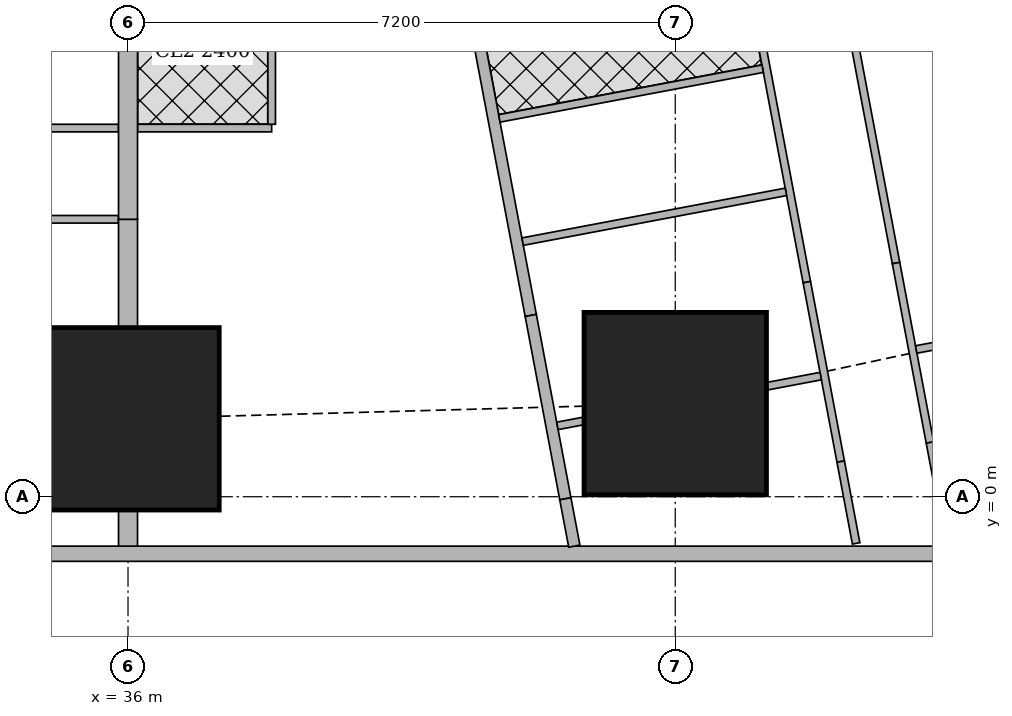
"""IFC4 building model, lengths in metres.
Left out: names, types, materials, properties, quantities, classifications, styles, units other than length and angle.
Written with IfcOpenShell. Run it as: python <this file> out.ifc"""

import sys

from ifc_helpers import new_model, si_unit, direction, frame, frame_2d, origin, origin_2d, place, context, subcontext, project, spatial, rectangle, extrude, element, fill, save


model = new_model("IFC4")
c1 = context("Model", 3, precision=1e-05, world=origin(), true_north=direction((0.0, 1.0)))
c2 = subcontext(c1, "Body", "Model", "MODEL_VIEW")
j1 = project(units=[si_unit("LENGTHUNIT", "METRE"), si_unit("PLANEANGLEUNIT", "RADIAN")], contexts=[c1])
p1 = place(None, origin())
s1 = spatial("IfcSite", under=j1, at=p1, CompositionType="ELEMENT")
p2 = place(p1, origin())
s2 = spatial("IfcBuilding", under=s1, at=p2, CompositionType="ELEMENT")
p3 = place(p2, frame((0.0, 0.0, 223.7)))
s3 = spatial("IfcBuildingStorey", under=s2, at=p3, CompositionType="ELEMENT", Elevation=223.7)
for number, where, z_axis, x_axis in (
    (1, (36.0, 1.025, 0.0), (0.0, 0.0, 1.0), (1.0, 0.0, 0.0)),
    (2, (43.2, 1.225, 0.0), (0.0, 0.0, 1.0), (1.0, 0.0, 0.0)),
):
    element("IfcColumn", number, at=place(p3, frame(where, z_axis=z_axis, x_axis=x_axis)), inside=s3, PredefinedType="COLUMN", context=c2, shape_type="SweptSolid", body=[
        extrude(rectangle(XDim=2.4, YDim=2.4, at=origin_2d()), origin(), (0.0, 0.0, 1.0), 3.75),
    ])
p4 = place(p3, frame((14.563, -0.75, 0.0), z_axis=(0.0, 0.0, 1.0), x_axis=(1.0, 0.0, 0.0)))
e3 = element("IfcWall", 3, at=p4, inside=s3, PredefinedType="SOLIDWALL", context=c2, shape_type="SweptSolid", body=[
    extrude(rectangle(XDim=33.228, YDim=0.2, at=frame_2d((16.614, 0.0))), origin(), (0.0, 0.0, 1.0), 3.5),
])
p5 = place(p4, frame((2.319, 0.0, 0.9)))
e4 = element("IfcOpeningElement", 4, at=p5, cuts=e3, PredefinedType="OPENING", context=c2, shape_type="SweptSolid", body=[
    extrude(rectangle(XDim=2.4, YDim=1.5, at=frame_2d((1.2, 0.75))), frame((0.0, 0.11, 0.0), z_axis=(0.0, -1.0, 0.0), x_axis=(1.0, 0.0, 0.0)), (0.0, 0.0, 1.0), 0.22),
])
p6 = place(p4, frame((7.937, 0.0, 0.9)))
e5 = element("IfcOpeningElement", 5, at=p6, cuts=e3, PredefinedType="OPENING", context=c2, shape_type="SweptSolid", body=[
    extrude(rectangle(XDim=1.8, YDim=1.5, at=frame_2d((0.9, 0.75))), frame((0.0, 0.11, 0.0), z_axis=(0.0, -1.0, 0.0), x_axis=(1.0, 0.0, 0.0)), (0.0, 0.0, 1.0), 0.22),
])
p7 = place(p4, frame((11.537, 0.0, 0.9)))
e6 = element("IfcOpeningElement", 6, at=p7, cuts=e3, PredefinedType="OPENING", context=c2, shape_type="SweptSolid", body=[
    extrude(rectangle(XDim=1.8, YDim=1.5, at=frame_2d((0.9, 0.75))), frame((0.0, 0.11, 0.0), z_axis=(0.0, -1.0, 0.0), x_axis=(1.0, 0.0, 0.0)), (0.0, 0.0, 1.0), 0.22),
])
p8 = place(p4, frame((15.137, 0.0, 0.9)))
e7 = element("IfcOpeningElement", 7, at=p8, cuts=e3, PredefinedType="OPENING", context=c2, shape_type="SweptSolid", body=[
    extrude(rectangle(XDim=1.8, YDim=1.5, at=frame_2d((0.9, 0.75))), frame((0.0, 0.11, 0.0), z_axis=(0.0, -1.0, 0.0), x_axis=(1.0, 0.0, 0.0)), (0.0, 0.0, 1.0), 0.22),
])
p9 = place(p4, frame((18.737, 0.0, 0.9)))
e8 = element("IfcOpeningElement", 8, at=p9, cuts=e3, PredefinedType="OPENING", context=c2, shape_type="SweptSolid", body=[
    extrude(rectangle(XDim=1.8, YDim=1.5, at=frame_2d((0.9, 0.75))), frame((0.0, 0.11, 0.0), z_axis=(0.0, -1.0, 0.0), x_axis=(1.0, 0.0, 0.0)), (0.0, 0.0, 1.0), 0.22),
])
p10 = place(p4, frame((22.337, 0.0, 0.9)))
e9 = element("IfcOpeningElement", 9, at=p10, cuts=e3, PredefinedType="OPENING", context=c2, shape_type="SweptSolid", body=[
    extrude(rectangle(XDim=1.8, YDim=1.5, at=frame_2d((0.9, 0.75))), frame((0.0, 0.11, 0.0), z_axis=(0.0, -1.0, 0.0), x_axis=(1.0, 0.0, 0.0)), (0.0, 0.0, 1.0), 0.22),
])
p11 = place(p3, frame((50.653, 2.703, 0.0), z_axis=(0.0, 0.0, 1.0), x_axis=(-0.185612026696, 0.982623109613, 0.0)))
e10 = element("IfcWall", 10, at=p11, inside=s3, PredefinedType="SOLIDWALL", context=c2, shape_type="SweptSolid", body=[
    extrude(rectangle(XDim=41.393, YDim=0.2, at=frame_2d((20.697, 0.0))), origin(), (0.0, 0.0, 1.0), 3.5),
])
p12 = place(p11, frame((1.633, 0.0, 0.9)))
e11 = element("IfcOpeningElement", 11, at=p12, cuts=e10, PredefinedType="OPENING", context=c2, shape_type="SweptSolid", body=[
    extrude(rectangle(XDim=1.8, YDim=1.5, at=frame_2d((0.9, 0.75))), frame((0.0, 0.11, 0.0), z_axis=(0.0, -1.0, 0.0), x_axis=(1.0, 0.0, 0.0)), (0.0, 0.0, 1.0), 0.22),
])
p13 = place(p11, frame((6.032, 0.0, 0.9)))
e12 = element("IfcOpeningElement", 12, at=p13, cuts=e10, PredefinedType="OPENING", context=c2, shape_type="SweptSolid", body=[
    extrude(rectangle(XDim=1.8, YDim=1.5, at=frame_2d((0.9, 0.75))), frame((0.0, 0.11, 0.0), z_axis=(0.0, -1.0, 0.0), x_axis=(1.0, 0.0, 0.0)), (0.0, 0.0, 1.0), 0.22),
])
p14 = place(p11, frame((9.848, 0.0, 0.9)))
e13 = element("IfcOpeningElement", 13, at=p14, cuts=e10, PredefinedType="OPENING", context=c2, shape_type="SweptSolid", body=[
    extrude(rectangle(XDim=1.8, YDim=1.5, at=frame_2d((0.9, 0.75))), frame((0.0, 0.11, 0.0), z_axis=(0.0, -1.0, 0.0), x_axis=(1.0, 0.0, 0.0)), (0.0, 0.0, 1.0), 0.22),
])
p15 = place(p11, frame((13.664, 0.0, 0.9)))
e14 = element("IfcOpeningElement", 14, at=p15, cuts=e10, PredefinedType="OPENING", context=c2, shape_type="SweptSolid", body=[
    extrude(rectangle(XDim=1.8, YDim=1.5, at=frame_2d((0.9, 0.75))), frame((0.0, 0.11, 0.0), z_axis=(0.0, -1.0, 0.0), x_axis=(1.0, 0.0, 0.0)), (0.0, 0.0, 1.0), 0.22),
])
p16 = place(p11, frame((17.481, 0.0, 0.9)))
e15 = element("IfcOpeningElement", 15, at=p16, cuts=e10, PredefinedType="OPENING", context=c2, shape_type="SweptSolid", body=[
    extrude(rectangle(XDim=1.8, YDim=1.5, at=frame_2d((0.9, 0.75))), frame((0.0, 0.11, 0.0), z_axis=(0.0, -1.0, 0.0), x_axis=(1.0, 0.0, 0.0)), (0.0, 0.0, 1.0), 0.22),
])
p17 = place(p11, frame((21.297, 0.0, 0.9)))
e16 = element("IfcOpeningElement", 16, at=p17, cuts=e10, PredefinedType="OPENING", context=c2, shape_type="SweptSolid", body=[
    extrude(rectangle(XDim=1.8, YDim=1.5, at=frame_2d((0.9, 0.75))), frame((0.0, 0.11, 0.0), z_axis=(0.0, -1.0, 0.0), x_axis=(1.0, 0.0, 0.0)), (0.0, 0.0, 1.0), 0.22),
])
p18 = place(p11, frame((25.113, 0.0, 0.9)))
e17 = element("IfcOpeningElement", 17, at=p18, cuts=e10, PredefinedType="OPENING", context=c2, shape_type="SweptSolid", body=[
    extrude(rectangle(XDim=1.8, YDim=1.5, at=frame_2d((0.9, 0.75))), frame((0.0, 0.11, 0.0), z_axis=(0.0, -1.0, 0.0), x_axis=(1.0, 0.0, 0.0)), (0.0, 0.0, 1.0), 0.22),
])
p19 = place(p11, frame((28.93, 0.0, 0.9)))
e18 = element("IfcOpeningElement", 18, at=p19, cuts=e10, PredefinedType="OPENING", context=c2, shape_type="SweptSolid", body=[
    extrude(rectangle(XDim=1.8, YDim=1.5, at=frame_2d((0.9, 0.75))), frame((0.0, 0.11, 0.0), z_axis=(0.0, -1.0, 0.0), x_axis=(1.0, 0.0, 0.0)), (0.0, 0.0, 1.0), 0.22),
])
p20 = place(p11, frame((32.746, 0.0, 0.9)))
e19 = element("IfcOpeningElement", 19, at=p20, cuts=e10, PredefinedType="OPENING", context=c2, shape_type="SweptSolid", body=[
    extrude(rectangle(XDim=1.8, YDim=1.5, at=frame_2d((0.9, 0.75))), frame((0.0, 0.11, 0.0), z_axis=(0.0, -1.0, 0.0), x_axis=(1.0, 0.0, 0.0)), (0.0, 0.0, 1.0), 0.22),
])
p21 = place(p11, frame((36.481, 0.0, 0.9)))
e20 = element("IfcOpeningElement", 20, at=p21, cuts=e10, PredefinedType="OPENING", context=c2, shape_type="SweptSolid", body=[
    extrude(rectangle(XDim=1.8, YDim=1.5, at=frame_2d((0.9, 0.75))), frame((0.0, 0.11, 0.0), z_axis=(0.0, -1.0, 0.0), x_axis=(1.0, 0.0, 0.0)), (0.0, 0.0, 1.0), 0.22),
])
p22 = place(p3, frame((33.68, 42.723, 0.0), z_axis=(0.0, 0.0, 1.0), x_axis=(0.185601160014, -0.982625162207, 0.0)))
e21 = element("IfcWall", 21, at=p22, inside=s3, PredefinedType="SOLIDWALL", context=c2, shape_type="SweptSolid", body=[
    extrude(rectangle(XDim=41.051, YDim=0.15, at=frame_2d((20.526, 0.0))), origin(), (0.0, 0.0, 1.0), 2.5),
])
p23 = place(p22, frame((16.123, 0.0, 0.0)))
e22 = element("IfcOpeningElement", 22, at=p23, cuts=e21, PredefinedType="OPENING", context=c2, shape_type="SweptSolid", body=[
    extrude(rectangle(XDim=1.0, YDim=2.1, at=frame_2d((0.5, 1.05))), frame((0.0, 0.085, 0.0), z_axis=(0.0, -1.0, 0.0), x_axis=(1.0, 0.0, 0.0)), (0.0, 0.0, 1.0), 0.17),
])
p24 = place(p22, frame((19.938, 0.0, 0.0)))
e23 = element("IfcOpeningElement", 23, at=p24, cuts=e21, PredefinedType="OPENING", context=c2, shape_type="SweptSolid", body=[
    extrude(rectangle(XDim=1.0, YDim=2.1, at=frame_2d((0.5, 1.05))), frame((0.0, 0.085, 0.0), z_axis=(0.0, -1.0, 0.0), x_axis=(1.0, 0.0, 0.0)), (0.0, 0.0, 1.0), 0.17),
])
p25 = place(p22, frame((30.902, 0.0, 0.0)))
e24 = element("IfcOpeningElement", 24, at=p25, cuts=e21, PredefinedType="OPENING", context=c2, shape_type="SweptSolid", body=[
    extrude(rectangle(XDim=1.0, YDim=2.1, at=frame_2d((0.5, 1.05))), frame((0.0, 0.085, 0.0), z_axis=(0.0, -1.0, 0.0), x_axis=(1.0, 0.0, 0.0)), (0.0, 0.0, 1.0), 0.17),
])
p26 = place(p3, frame((41.299, 2.385, 0.0), z_axis=(0.0, 0.0, 1.0), x_axis=(0.18529731833, -0.982682504077, 0.0)))
e25 = element("IfcWall", 25, at=p26, inside=s3, PredefinedType="SOLIDWALL", context=c2, shape_type="SweptSolid", body=[
    extrude(rectangle(XDim=2.455, YDim=0.15, at=frame_2d((1.227, 0.0))), origin(), (0.0, 0.0, 1.0), 2.05),
])
p27 = place(p3, frame((41.754, -0.027, 0.0), z_axis=(0.0, 0.0, 1.0), x_axis=(0.186404157015, -0.982473149886, 0.0)))
e26 = element("IfcWall", 26, at=p27, inside=s3, PredefinedType="SOLIDWALL", context=c2, shape_type="SweptSolid", body=[
    extrude(rectangle(XDim=0.634, YDim=0.15, at=frame_2d((0.317, 0.0))), origin(), (0.0, 0.0, 1.0), 3.5),
])
p28 = place(p3, frame((35.875, 3.65, 0.0), z_axis=(0.0, 0.0, 1.0), x_axis=(-1.0, 0.0, 0.0)))
e27 = element("IfcWall", 27, at=p28, inside=s3, PredefinedType="PARTITIONING", context=c2, shape_type="SweptSolid", body=[
    extrude(rectangle(XDim=7.075, YDim=0.1, at=frame_2d((3.538, 0.0))), origin(), (0.0, 0.0, 1.0), 3.5),
])
p29 = place(p28, frame((4.95, 0.0, 0.0)))
e28 = element("IfcOpeningElement", 28, at=p29, cuts=e27, PredefinedType="OPENING", context=c2, shape_type="SweptSolid", body=[
    extrude(rectangle(XDim=0.9, YDim=2.1, at=frame_2d((0.45, 1.05))), frame((0.0, 0.06, 0.0), z_axis=(0.0, -1.0, 0.0), x_axis=(1.0, 0.0, 0.0)), (0.0, 0.0, 1.0), 0.12),
])
p30 = place(p28, frame((2.375, 0.0, 0.0)))
e29 = element("IfcOpeningElement", 29, at=p30, cuts=e27, PredefinedType="OPENING", context=c2, shape_type="SweptSolid", body=[
    extrude(rectangle(XDim=0.9, YDim=2.1, at=frame_2d((0.45, 1.05))), frame((0.0, 0.06, 0.0), z_axis=(0.0, -1.0, 0.0), x_axis=(1.0, 0.0, 0.0)), (0.0, 0.0, 1.0), 0.12),
])
p31 = place(p3, frame((35.875, 4.85, 0.0), z_axis=(0.0, 0.0, 1.0), x_axis=(-1.0, 0.0, 0.0)))
e30 = element("IfcWall", 30, at=p31, inside=s3, PredefinedType="PARTITIONING", context=c2, shape_type="SweptSolid", body=[
    extrude(rectangle(XDim=7.075, YDim=0.1, at=frame_2d((3.538, 0.0))), origin(), (0.0, 0.0, 1.0), 3.5),
])
p32 = place(p31, frame((5.6, 0.0, 0.0)))
e31 = element("IfcOpeningElement", 31, at=p32, cuts=e30, PredefinedType="OPENING", context=c2, shape_type="SweptSolid", body=[
    extrude(rectangle(XDim=0.9, YDim=2.1, at=frame_2d((0.45, 1.05))), frame((0.0, 0.06, 0.0), z_axis=(0.0, -1.0, 0.0), x_axis=(1.0, 0.0, 0.0)), (0.0, 0.0, 1.0), 0.12),
])
p33 = place(p31, frame((2.225, 0.0, 0.0)))
e32 = element("IfcOpeningElement", 32, at=p33, cuts=e30, PredefinedType="OPENING", context=c2, shape_type="SweptSolid", body=[
    extrude(rectangle(XDim=0.9, YDim=2.1, at=frame_2d((0.45, 1.05))), frame((0.0, 0.06, 0.0), z_axis=(0.0, -1.0, 0.0), x_axis=(1.0, 0.0, 0.0)), (0.0, 0.0, 1.0), 0.12),
])
p34 = place(p31, frame((3.8, 0.0, 0.0)))
e33 = element("IfcOpeningElement", 33, at=p34, cuts=e30, PredefinedType="OPENING", context=c2, shape_type="SweptSolid", body=[
    extrude(rectangle(XDim=0.9, YDim=2.1, at=frame_2d((0.45, 1.05))), frame((0.0, 0.06, 0.0), z_axis=(0.0, -1.0, 0.0), x_axis=(1.0, 0.0, 0.0)), (0.0, 0.0, 1.0), 0.12),
])
p35 = place(p31, frame((0.425, 0.0, 0.0)))
e34 = element("IfcOpeningElement", 34, at=p35, cuts=e30, PredefinedType="OPENING", context=c2, shape_type="SweptSolid", body=[
    extrude(rectangle(XDim=0.9, YDim=2.1, at=frame_2d((0.45, 1.05))), frame((0.0, 0.06, 0.0), z_axis=(0.0, -1.0, 0.0), x_axis=(1.0, 0.0, 0.0)), (0.0, 0.0, 1.0), 0.12),
])
p36 = place(p3, frame((37.89, 4.85, 0.0), z_axis=(0.0, 0.0, 1.0), x_axis=(-1.0, 0.0, 0.0)))
e35 = element("IfcWall", 35, at=p36, inside=s3, PredefinedType="PARTITIONING", context=c2, shape_type="SweptSolid", body=[
    extrude(rectangle(XDim=1.765, YDim=0.1, at=frame_2d((0.882, 0.0))), origin(), (0.0, 0.0, 1.0), 3.5),
])
p37 = place(p36, frame((0.49, 0.0, 0.0)))
e36 = element("IfcOpeningElement", 36, at=p37, cuts=e35, PredefinedType="OPENING", context=c2, shape_type="SweptSolid", body=[
    extrude(rectangle(XDim=0.9, YDim=2.1, at=frame_2d((0.45, 1.05))), frame((0.0, 0.06, 0.0), z_axis=(0.0, -1.0, 0.0), x_axis=(1.0, 0.0, 0.0)), (0.0, 0.0, 1.0), 0.12),
])
p38 = place(p3, frame((37.89, 4.9, 0.0), z_axis=(0.0, 0.0, 1.0), x_axis=(0.0, 1.0, 0.0)))
e37 = element("IfcWall", 37, at=p38, inside=s3, PredefinedType="PARTITIONING", context=c2, shape_type="SweptSolid", body=[
    extrude(rectangle(XDim=3.525, YDim=0.1, at=frame_2d((1.763, 0.0))), origin(), (0.0, 0.0, 1.0), 3.5),
])
p39 = place(p3, frame((36.0, -0.65, 0.0), z_axis=(0.0, 0.0, 1.0), x_axis=(0.0, 1.0, 0.0)))
e38 = element("IfcWall", 38, at=p39, inside=s3, PredefinedType="SOLIDWALL", context=c2, shape_type="SweptSolid", body=[
    extrude(rectangle(XDim=0.474, YDim=0.25, at=frame_2d((0.237, 0.0))), origin(), (0.0, 0.0, 1.0), 2.05),
])
p40 = place(p3, frame((36.0, 2.226, 0.0), z_axis=(0.0, 0.0, 1.0), x_axis=(0.0, 1.0, 0.0)))
e39 = element("IfcWall", 39, at=p40, inside=s3, PredefinedType="SOLIDWALL", context=c2, shape_type="SweptSolid", body=[
    extrude(rectangle(XDim=1.424, YDim=0.25, at=frame_2d((0.712, 0.0))), origin(), (0.0, 0.0, 1.0), 2.05),
])
p41 = place(p3, frame((36.0, 3.65, 0.0), z_axis=(0.0, 0.0, 1.0), x_axis=(0.0, 1.0, 0.0)))
e40 = element("IfcWall", 40, at=p41, inside=s3, PredefinedType="SOLIDWALL", context=c2, shape_type="SweptSolid", body=[
    extrude(rectangle(XDim=3.149, YDim=0.25, at=frame_2d((1.575, 0.0))), origin(), (0.0, 0.0, 1.0), 3.5),
])
p42 = place(p3, frame((44.727, 10.366, 0.0), z_axis=(0.0, 0.0, 1.0), x_axis=(0.185678775129, -0.982610498858, 0.0)))
e41 = element("IfcWall", 41, at=p42, inside=s3, PredefinedType="PARTITIONING", context=c2, shape_type="SweptSolid", body=[
    extrude(rectangle(XDim=7.421, YDim=0.1, at=frame_2d((3.71, 0.0))), origin(), (0.0, 0.0, 1.0), 3.5),
])
p43 = place(p42, frame((0.151, 0.0, 0.0)))
e42 = element("IfcOpeningElement", 42, at=p43, cuts=e41, PredefinedType="OPENING", context=c2, shape_type="SweptSolid", body=[
    extrude(rectangle(XDim=0.9, YDim=2.1, at=frame_2d((0.45, 1.05))), frame((0.0, 0.06, 0.0), z_axis=(0.0, -1.0, 0.0), x_axis=(1.0, 0.0, 0.0)), (0.0, 0.0, 1.0), 0.12),
])
p44 = place(p42, frame((4.65, 0.0, 0.0)))
e43 = element("IfcOpeningElement", 43, at=p44, cuts=e41, PredefinedType="OPENING", context=c2, shape_type="SweptSolid", body=[
    extrude(rectangle(XDim=0.9, YDim=2.1, at=frame_2d((0.45, 1.05))), frame((0.0, 0.06, 0.0), z_axis=(0.0, -1.0, 0.0), x_axis=(1.0, 0.0, 0.0)), (0.0, 0.0, 1.0), 0.12),
])
p45 = place(p3, frame((46.105, 3.074, 0.0), z_axis=(0.0, 0.0, 1.0), x_axis=(0.185631845838, -0.982619365681, 0.0)))
e44 = element("IfcWall", 44, at=p45, inside=s3, PredefinedType="PARTITIONING", context=c2, shape_type="SweptSolid", body=[
    extrude(rectangle(XDim=2.403, YDim=0.1, at=frame_2d((1.201, 0.0))), origin(), (0.0, 0.0, 1.0), 2.05),
])
p46 = place(p3, frame((46.551, 0.713, 0.0), z_axis=(0.0, 0.0, 1.0), x_axis=(0.185407859198, -0.982661653748, 0.0)))
e45 = element("IfcWall", 45, at=p46, inside=s3, PredefinedType="PARTITIONING", context=c2, shape_type="SweptSolid", body=[
    extrude(rectangle(XDim=1.343, YDim=0.1, at=frame_2d((0.671, 0.0))), origin(), (0.0, 0.0, 1.0), 3.5),
])
p47 = place(p3, frame((43.949, 8.02, 0.0), z_axis=(0.0, 0.0, 1.0), x_axis=(0.185656792073, -0.982614652627, 0.0)))
e46 = element("IfcWall", 46, at=p47, inside=s3, PredefinedType="PARTITIONING", context=c2, shape_type="SweptSolid", body=[
    extrude(rectangle(XDim=5.289, YDim=0.1, at=frame_2d((2.645, 0.0))), origin(), (0.0, 0.0, 1.0), 3.5),
])
p48 = place(p47, frame((1.2, 0.0, 0.0)))
e47 = element("IfcOpeningElement", 47, at=p48, cuts=e46, PredefinedType="OPENING", context=c2, shape_type="SweptSolid", body=[
    extrude(rectangle(XDim=0.9, YDim=2.1, at=frame_2d((0.45, 1.05))), frame((0.0, 0.06, 0.0), z_axis=(0.0, -1.0, 0.0), x_axis=(1.0, 0.0, 0.0)), (0.0, 0.0, 1.0), 0.12),
])
p49 = place(p47, frame((2.855, 0.0, 0.0)))
e48 = element("IfcOpeningElement", 48, at=p49, cuts=e46, PredefinedType="OPENING", context=c2, shape_type="SweptSolid", body=[
    extrude(rectangle(XDim=0.9, YDim=2.1, at=frame_2d((0.45, 1.05))), frame((0.0, 0.06, 0.0), z_axis=(0.0, -1.0, 0.0), x_axis=(1.0, 0.0, 0.0)), (0.0, 0.0, 1.0), 0.12),
])
p50 = place(p3, frame((44.931, 2.823, 0.0), z_axis=(0.0, 0.0, 1.0), x_axis=(0.185631845838, -0.982619365681, 0.0)))
e49 = element("IfcWall", 49, at=p50, inside=s3, PredefinedType="PARTITIONING", context=c2, shape_type="SweptSolid", body=[
    extrude(rectangle(XDim=2.403, YDim=0.1, at=frame_2d((1.201, 0.0))), origin(), (0.0, 0.0, 1.0), 2.05),
])
p51 = place(p3, frame((45.377, 0.462, 0.0), z_axis=(0.0, 0.0, 1.0), x_axis=(0.185513480919, -0.982641719243, 0.0)))
e50 = element("IfcWall", 50, at=p51, inside=s3, PredefinedType="PARTITIONING", context=c2, shape_type="SweptSolid", body=[
    extrude(rectangle(XDim=1.095, YDim=0.1, at=frame_2d((0.547, 0.0))), origin(), (0.0, 0.0, 1.0), 3.5),
])
p52 = place(p3, frame((46.738, 2.006, 0.0), z_axis=(0.0, 0.0, 1.0), x_axis=(-0.982820466874, -0.184564161994, 0.0)))
e51 = element("IfcWall", 51, at=p52, inside=s3, PredefinedType="PARTITIONING", context=c2, shape_type="SweptSolid", body=[
    extrude(rectangle(XDim=0.374, YDim=0.1, at=frame_2d((0.187, 0.0))), origin(), (0.0, 0.0, 1.0), 2.05),
])
p53 = place(p3, frame((45.114, 1.587, 0.0), z_axis=(0.0, 0.0, 1.0), x_axis=(-0.982671022916, -0.185358195723, 0.0)))
e52 = element("IfcWall", 52, at=p53, inside=s3, PredefinedType="PARTITIONING", context=c2, shape_type="SweptSolid", body=[
    extrude(rectangle(XDim=0.717, YDim=0.1, at=frame_2d((0.358, 0.0))), origin(), (0.0, 0.0, 1.0), 2.05),
])
p54 = place(p3, frame((41.99, 0.996, 0.0), z_axis=(0.0, 0.0, 1.0), x_axis=(-0.982639822555, -0.185523527159, 0.0)))
e53 = element("IfcWall", 53, at=p54, inside=s3, PredefinedType="PARTITIONING", context=c2, shape_type="SweptSolid", body=[
    extrude(rectangle(XDim=0.346, YDim=0.1, at=frame_2d((0.173, 0.0))), origin(), (0.0, 0.0, 1.0), 2.05),
])
p55 = place(p3, frame((44.35, 5.631, 0.0), z_axis=(0.0, 0.0, 1.0), x_axis=(-0.982638553676, -0.185530247748, 0.0)))
e54 = element("IfcWall", 54, at=p55, inside=s3, PredefinedType="PARTITIONING", context=c2, shape_type="SweptSolid", body=[
    extrude(rectangle(XDim=3.525, YDim=0.1, at=frame_2d((1.763, 0.0))), origin(), (0.0, 0.0, 1.0), 3.5),
])
p56 = place(p3, frame((41.192, 3.356, 0.0), z_axis=(0.0, 0.0, 1.0), x_axis=(0.982588017646, 0.185797706064, 0.0)))
e55 = element("IfcWall", 55, at=p56, inside=s3, PredefinedType="PARTITIONING", context=c2, shape_type="SweptSolid", body=[
    extrude(rectangle(XDim=3.525, YDim=0.1, at=frame_2d((1.763, 0.0))), origin(), (0.0, 0.0, 1.0), 3.5),
])
p57 = place(p56, frame((1.7, 0.0, 0.0)))
e56 = element("IfcOpeningElement", 56, at=p57, cuts=e55, PredefinedType="OPENING", context=c2, shape_type="SweptSolid", body=[
    extrude(rectangle(XDim=0.9, YDim=2.1, at=frame_2d((0.45, 1.05))), frame((0.0, 0.06, 0.0), z_axis=(0.0, -1.0, 0.0), x_axis=(1.0, 0.0, 0.0)), (0.0, 0.0, 1.0), 0.12),
])
p58 = place(p9, origin())
e57 = element("IfcWindow", 57, at=p58, inside=s3, PartitioningType="SINGLE_PANEL", PredefinedType="WINDOW", context=c2, shape_type="SweptSolid", body=[
    extrude(rectangle(XDim=1.8, YDim=1.5, at=frame_2d((0.9, 0.75))), frame((0.0, 0.03, 0.0), z_axis=(0.0, -1.0, 0.0), x_axis=(1.0, 0.0, 0.0)), (0.0, 0.0, 1.0), 0.06),
])
fill(e8, e57)
p59 = place(p10, origin())
e58 = element("IfcWindow", 58, at=p59, inside=s3, PartitioningType="SINGLE_PANEL", PredefinedType="WINDOW", context=c2, shape_type="SweptSolid", body=[
    extrude(rectangle(XDim=1.8, YDim=1.5, at=frame_2d((0.9, 0.75))), frame((0.0, 0.03, 0.0), z_axis=(0.0, -1.0, 0.0), x_axis=(1.0, 0.0, 0.0)), (0.0, 0.0, 1.0), 0.06),
])
fill(e9, e58)
p60 = place(p35, origin())
e59 = element("IfcDoor", 59, at=p60, inside=s3, OperationType="SINGLE_SWING_RIGHT", PredefinedType="DOOR", context=c2, shape_type="SweptSolid", body=[
    extrude(rectangle(XDim=0.9, YDim=2.1, at=frame_2d((0.45, 1.05))), frame((0.0, 0.025, 0.0), z_axis=(0.0, -1.0, 0.0), x_axis=(1.0, 0.0, 0.0)), (0.0, 0.0, 1.0), 0.05),
])
fill(e34, e59)
p61 = place(p37, origin())
e60 = element("IfcDoor", 60, at=p61, inside=s3, OperationType="SINGLE_SWING_LEFT", PredefinedType="DOOR", context=c2, shape_type="SweptSolid", body=[
    extrude(rectangle(XDim=0.9, YDim=2.1, at=frame_2d((0.45, 1.05))), frame((0.0, 0.025, 0.0), z_axis=(0.0, -1.0, 0.0), x_axis=(1.0, 0.0, 0.0)), (0.0, 0.0, 1.0), 0.05),
])
fill(e36, e60)
p62 = place(p44, origin())
e61 = element("IfcDoor", 61, at=p62, inside=s3, OperationType="SINGLE_SWING_LEFT", PredefinedType="DOOR", context=c2, shape_type="SweptSolid", body=[
    extrude(rectangle(XDim=0.9, YDim=2.1, at=frame_2d((0.45, 1.05))), frame((0.0, 0.025, 0.0), z_axis=(0.0, -1.0, 0.0), x_axis=(1.0, 0.0, 0.0)), (0.0, 0.0, 1.0), 0.05),
])
fill(e43, e61)
p63 = place(p49, origin())
e62 = element("IfcDoor", 62, at=p63, inside=s3, OperationType="SINGLE_SWING_LEFT", PredefinedType="DOOR", context=c2, shape_type="SweptSolid", body=[
    extrude(rectangle(XDim=0.9, YDim=2.1, at=frame_2d((0.45, 1.05))), frame((0.0, 0.025, 0.0), z_axis=(0.0, -1.0, 0.0), x_axis=(1.0, 0.0, 0.0)), (0.0, 0.0, 1.0), 0.05),
])
fill(e48, e62)
p64 = place(p57, origin())
e63 = element("IfcDoor", 63, at=p64, inside=s3, OperationType="SINGLE_SWING_RIGHT", PredefinedType="DOOR", context=c2, shape_type="SweptSolid", body=[
    extrude(rectangle(XDim=0.9, YDim=2.1, at=frame_2d((0.45, 1.05))), frame((0.0, 0.025, 0.0), z_axis=(0.0, -1.0, 0.0), x_axis=(1.0, 0.0, 0.0)), (0.0, 0.0, 1.0), 0.05),
])
fill(e56, e63)
save(model, sys.argv[1])
